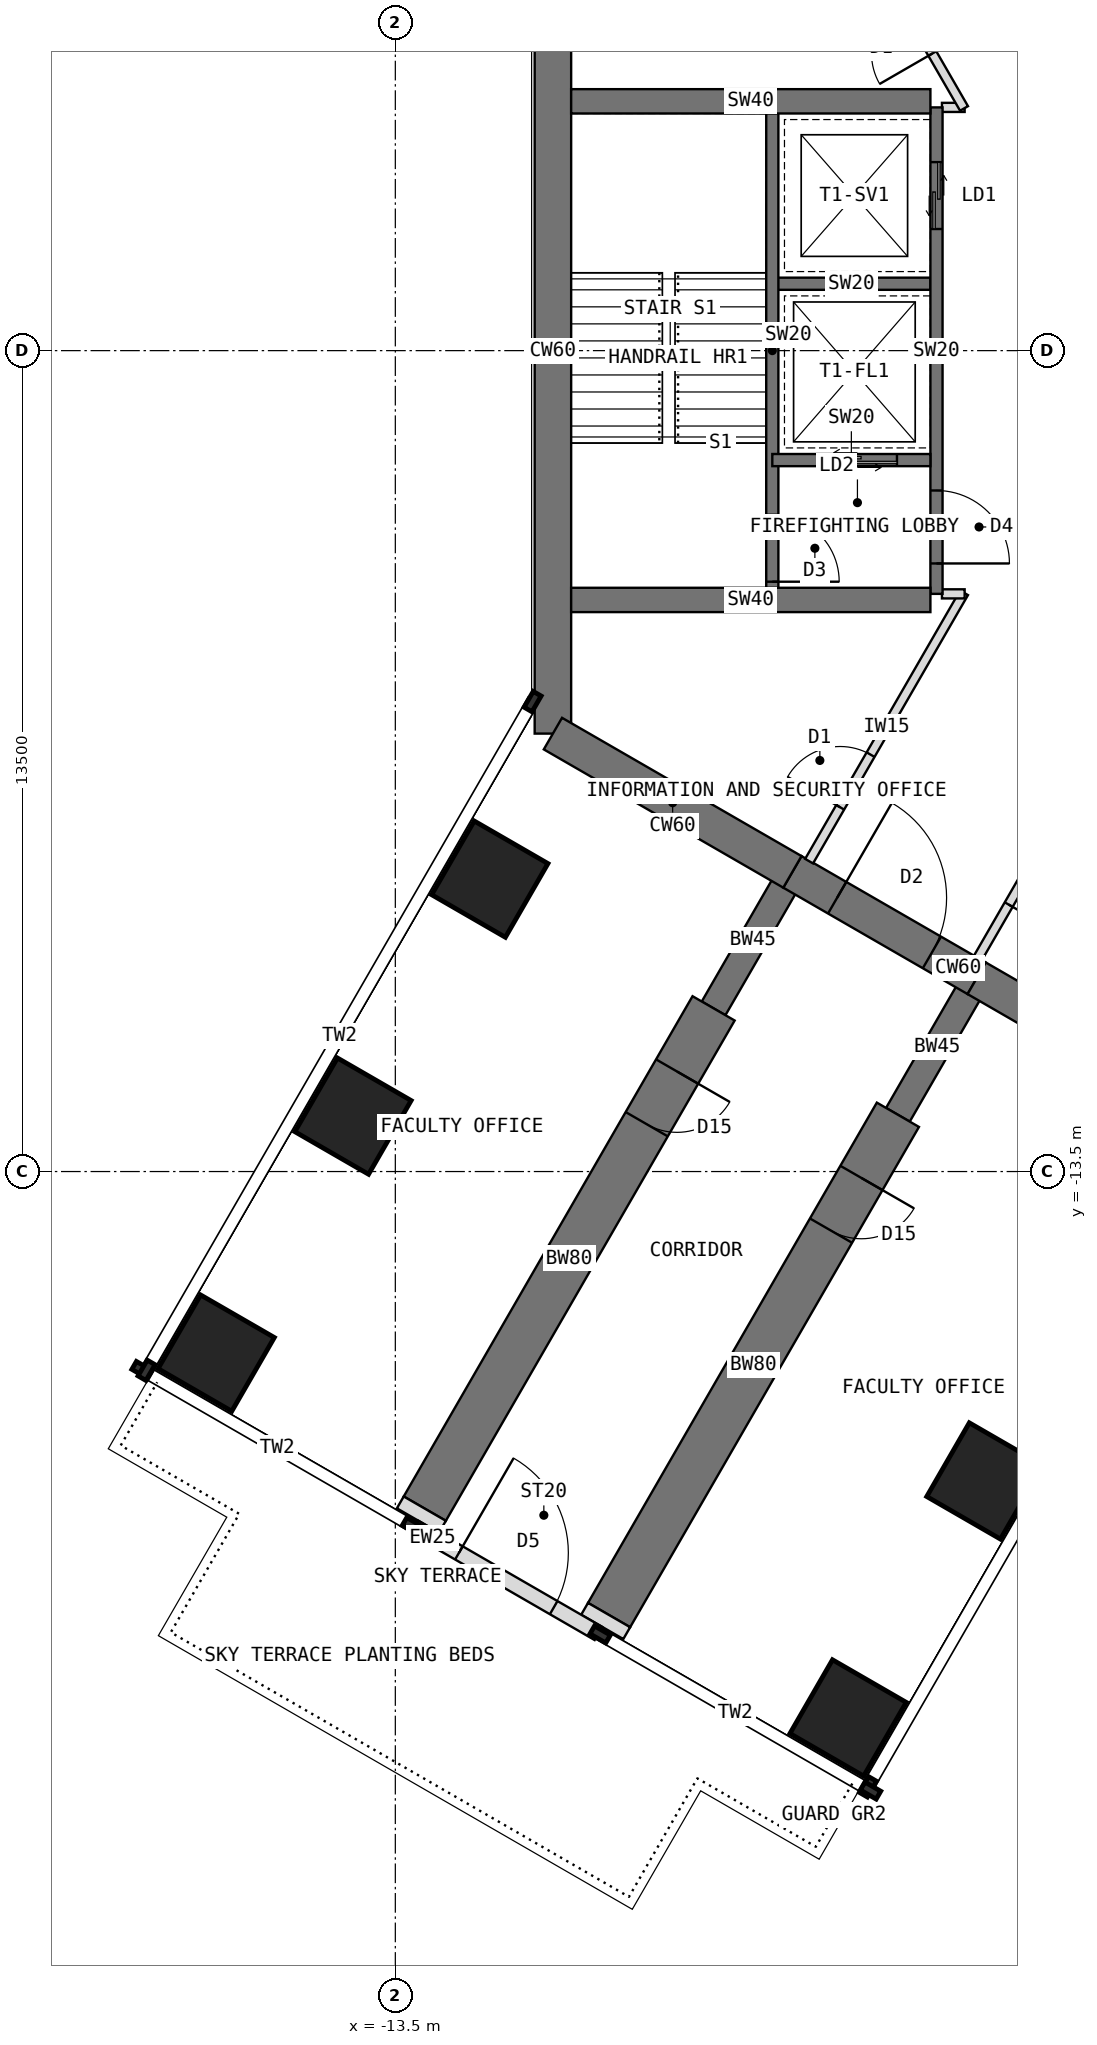
"""IFC4 building model, lengths in metres.
Left out: names, types, materials, properties, quantities, classifications, styles, units other than length and angle.
Written with IfcOpenShell. Run it as: python <this file> out.ifc"""

import sys

from ifc_helpers import new_model, si_unit, direction, frame, frame_2d, origin, origin_2d, place, context, subcontext, project, spatial, rectangle, extrude, element, fill, save


model = new_model("IFC4")
c1 = context("Model", 3, precision=1e-05, world=origin(), true_north=direction((0.0, 1.0)))
c2 = subcontext(c1, "Body", "Model", "MODEL_VIEW")
j1 = project(units=[si_unit("LENGTHUNIT", "METRE"), si_unit("PLANEANGLEUNIT", "RADIAN")], contexts=[c1])
p1 = place(None, origin())
s1 = spatial("IfcSite", under=j1, at=p1, CompositionType="ELEMENT")
p2 = place(p1, origin())
s2 = spatial("IfcBuilding", under=s1, at=p2, CompositionType="ELEMENT")
p3 = place(p2, frame((0.0, 0.0, 97.5)))
s3 = spatial("IfcBuildingStorey", under=s2, at=p3, CompositionType="ELEMENT", Elevation=97.5)
p4 = place(p3, frame((-10.908, 6.298, 0.0), z_axis=(0.0, 0.0, 1.0), x_axis=(0.0, -1.0, 0.0)))
e1 = element("IfcWall", 1, at=p4, inside=s3, PredefinedType="SHEAR", context=c2, shape_type="SweptSolid", body=[
    extrude(rectangle(XDim=12.596, YDim=0.6, at=frame_2d((6.298, 0.0))), origin(), (0.0, 0.0, 1.0), 4.0),
])
p5 = place(p3, frame((-10.908, -6.298, 0.0), z_axis=(0.0, 0.0, 1.0), x_axis=(0.866034513004, -0.499984222037, 0.0)))
e2 = element("IfcWall", 2, at=p5, inside=s3, PredefinedType="SHEAR", context=c2, shape_type="SweptSolid", body=[
    extrude(rectangle(XDim=4.548, YDim=0.6, at=frame_2d((2.274, 0.0))), origin(), (0.0, 0.0, 1.0), 4.0),
])
p6 = place(p3, frame((-6.97, -8.572, 0.0), z_axis=(0.0, 0.0, 1.0), x_axis=(0.866019471182, -0.500010275428, 0.0)))
e3 = element("IfcWall", 3, at=p6, inside=s3, PredefinedType="SHEAR", context=c2, shape_type="SweptSolid", body=[
    extrude(rectangle(XDim=3.5, YDim=0.6, at=frame_2d((1.75, 0.0))), origin(), (0.0, 0.0, 1.0), 4.0),
])
p7 = place(p6, frame((0.85, 0.0, 0.0)))
e4 = element("IfcOpeningElement", 4, at=p7, cuts=e3, PredefinedType="OPENING", context=c2, shape_type="SweptSolid", body=[
    extrude(rectangle(XDim=1.8, YDim=2.1, at=frame_2d((0.9, 1.05))), frame((0.0, 0.31, 0.0), z_axis=(0.0, -1.0, 0.0), x_axis=(1.0, 0.0, 0.0)), (0.0, 0.0, 1.0), 0.62),
])
p8 = place(p3, frame((-3.939, -10.322, 0.0), z_axis=(0.0, 0.0, 1.0), x_axis=(0.866011268655, -0.500024481964, 0.0)))
e5 = element("IfcWall", 5, at=p8, inside=s3, PredefinedType="SHEAR", context=c2, shape_type="SweptSolid", body=[
    extrude(rectangle(XDim=4.548, YDim=0.6, at=frame_2d((2.274, 0.0))), origin(), (0.0, 0.0, 1.0), 4.0),
])
p9 = place(p3, frame((-3.939, -10.322, 0.0), z_axis=(0.0, 0.0, 1.0), x_axis=(-0.499918158782, -0.866072649678, 0.0)))
e6 = element("IfcWall", 6, at=p9, inside=s3, PredefinedType="SHEAR", context=c2, shape_type="SweptSolid", body=[
    extrude(rectangle(XDim=2.592, YDim=0.45, at=frame_2d((1.296, 0.0))), origin(), (0.0, 0.0, 1.0), 4.0),
])
p10 = place(p3, frame((-5.234, -12.566, 0.0), z_axis=(0.0, 0.0, 1.0), x_axis=(-0.499997557548, -0.86602681393, 0.0)))
e7 = element("IfcWall", 7, at=p10, inside=s3, PredefinedType="SHEAR", context=c2, shape_type="SweptSolid", body=[
    extrude(rectangle(XDim=9.5, YDim=0.8, at=frame_2d((4.75, 0.0))), origin(), (0.0, 0.0, 1.0), 4.0),
])
p11 = place(p10, frame((1.2, 0.0, 0.0)))
e8 = element("IfcOpeningElement", 8, at=p11, cuts=e7, PredefinedType="OPENING", context=c2, shape_type="SweptSolid", body=[
    extrude(rectangle(XDim=1.0, YDim=2.1, at=frame_2d((0.5, 1.05))), frame((0.0, 0.41, 0.0), z_axis=(0.0, -1.0, 0.0), x_axis=(1.0, 0.0, 0.0)), (0.0, 0.0, 1.0), 0.82),
])
p12 = place(p3, frame((-6.97, -8.572, 0.0), z_axis=(0.0, 0.0, 1.0), x_axis=(-0.499988811324, -0.866031863473, 0.0)))
e9 = element("IfcWall", 9, at=p12, inside=s3, PredefinedType="SHEAR", context=c2, shape_type="SweptSolid", body=[
    extrude(rectangle(XDim=2.592, YDim=0.45, at=frame_2d((1.296, 0.0))), origin(), (0.0, 0.0, 1.0), 4.0),
])
p13 = place(p3, frame((-8.266, -10.816, 0.0), z_axis=(0.0, 0.0, 1.0), x_axis=(-0.499997557548, -0.86602681393, 0.0)))
e10 = element("IfcWall", 10, at=p13, inside=s3, PredefinedType="SHEAR", context=c2, shape_type="SweptSolid", body=[
    extrude(rectangle(XDim=9.5, YDim=0.8, at=frame_2d((4.75, 0.0))), origin(), (0.0, 0.0, 1.0), 4.0),
])
p14 = place(p13, frame((1.2, 0.0, 0.0)))
e11 = element("IfcOpeningElement", 11, at=p14, cuts=e10, PredefinedType="OPENING", context=c2, shape_type="SweptSolid", body=[
    extrude(rectangle(XDim=1.0, YDim=2.1, at=frame_2d((0.5, 1.05))), frame((0.0, 0.41, 0.0), z_axis=(0.0, -1.0, 0.0), x_axis=(1.0, 0.0, 0.0)), (0.0, 0.0, 1.0), 0.82),
])
for number, where, z_axis, x_axis in (
    (12, (-11.946, -8.691, 0.0), (0.0, 0.0, 1.0), (0.5, 0.866, 0.0)),
    (13, (-3.804, -18.588, 0.0), (0.0, 0.0, 1.0), (0.5, 0.866, 0.0)),
    (14, (-14.196, -12.588, 0.0), (0.0, 0.0, 1.0), (0.5, 0.866, 0.0)),
    (15, (-6.054, -22.486, 0.0), (0.0, 0.0, 1.0), (0.5, 0.866, 0.0)),
    (16, (-16.446, -16.486, 0.0), (0.0, 0.0, 1.0), (0.5, 0.866, 0.0)),
):
    element("IfcColumn", number, at=place(p3, frame(where, z_axis=z_axis, x_axis=x_axis)), inside=s3, PredefinedType="COLUMN", context=c2, shape_type="SweptSolid", body=[
        extrude(rectangle(XDim=1.4, YDim=1.4, at=origin_2d()), origin(), (0.0, 0.0, 1.0), 4.0),
    ])
p15 = place(p3, frame((-13.19, -19.347, 0.0), z_axis=(0.0, 0.0, 1.0), x_axis=(0.866019471182, -0.500010275428, 0.0)))
e17 = element("IfcWall", 17, at=p15, inside=s3, PredefinedType="STANDARD", context=c2, shape_type="SweptSolid", body=[
    extrude(rectangle(XDim=3.5, YDim=0.25, at=frame_2d((1.75, 0.0))), origin(), (0.0, 0.0, 1.0), 3.8),
])
p16 = place(p15, frame((0.85, 0.0, 0.0)))
e18 = element("IfcOpeningElement", 18, at=p16, cuts=e17, PredefinedType="OPENING", context=c2, shape_type="SweptSolid", body=[
    extrude(rectangle(XDim=1.8, YDim=2.4, at=frame_2d((0.9, 1.2))), frame((0.0, 0.135, 0.0), z_axis=(0.0, -1.0, 0.0), x_axis=(1.0, 0.0, 0.0)), (0.0, 0.0, 1.0), 0.27),
])
p17 = place(p3, frame((-9.984, -20.794, 0.0), z_axis=(0.0, 0.0, 1.0), x_axis=(-0.500223362819, -0.865896406789, 0.0)))
e19 = element("IfcWall", 19, at=p17, inside=s3, PredefinedType="PARTITIONING", context=c2, shape_type="SweptSolid", body=[
    extrude(rectangle(XDim=0.225, YDim=0.8, at=frame_2d((0.113, 0.0))), origin(), (0.0, 0.0, 1.0), 3.8),
])
p18 = place(p3, frame((-13.016, -19.044, 0.0), z_axis=(0.0, 0.0, 1.0), x_axis=(-0.499409130319, -0.866366273901, 0.0)))
e20 = element("IfcWall", 20, at=p18, inside=s3, PredefinedType="PARTITIONING", context=c2, shape_type="SweptSolid", body=[
    extrude(rectangle(XDim=0.225, YDim=0.8, at=frame_2d((0.112, 0.0))), origin(), (0.0, 0.0, 1.0), 3.8),
])
p19 = place(p3, frame((-4.6, 4.0, 0.0), z_axis=(0.0, 0.0, 1.0), x_axis=(0.0, -1.0, 0.0)))
e21 = element("IfcWall", 21, at=p19, inside=s3, PredefinedType="SHEAR", context=c2, shape_type="SweptSolid", body=[
    extrude(rectangle(XDim=8.0, YDim=0.2, at=frame_2d((4.0, 0.0))), origin(), (0.0, 0.0, 1.0), 4.0),
])
p20 = place(p19, frame((6.3, 0.0, 0.0)))
e22 = element("IfcOpeningElement", 22, at=p20, cuts=e21, PredefinedType="OPENING", context=c2, shape_type="SweptSolid", body=[
    extrude(rectangle(XDim=1.2, YDim=2.1, at=frame_2d((0.6, 1.05))), frame((0.0, 0.11, 0.0), z_axis=(0.0, -1.0, 0.0), x_axis=(1.0, 0.0, 0.0)), (0.0, 0.0, 1.0), 0.22),
])
p21 = place(p19, frame((0.9, 0.0, 0.0)))
e23 = element("IfcOpeningElement", 23, at=p21, cuts=e21, PredefinedType="OPENING", context=c2, shape_type="SweptSolid", body=[
    extrude(rectangle(XDim=1.1, YDim=2.2, at=frame_2d((0.55, 1.1))), frame((0.0, 0.11, 0.0), z_axis=(0.0, -1.0, 0.0), x_axis=(1.0, 0.0, 0.0)), (0.0, 0.0, 1.0), 0.22),
])
p22 = place(p3, frame((-4.7, 1.1, 0.0), z_axis=(0.0, 0.0, 1.0), x_axis=(-1.0, 0.0, 0.0)))
e24 = element("IfcWall", 24, at=p22, inside=s3, PredefinedType="SHEAR", context=c2, shape_type="SweptSolid", body=[
    extrude(rectangle(XDim=2.6, YDim=0.2, at=frame_2d((1.3, 0.0))), origin(), (0.0, 0.0, 1.0), 4.0),
])
p23 = place(p3, frame((-4.7, -1.8, 0.0), z_axis=(0.0, 0.0, 1.0), x_axis=(-1.0, 0.0, 0.0)))
e25 = element("IfcWall", 25, at=p23, inside=s3, PredefinedType="SHEAR", context=c2, shape_type="SweptSolid", body=[
    extrude(rectangle(XDim=2.6, YDim=0.2, at=frame_2d((1.3, 0.0))), origin(), (0.0, 0.0, 1.0), 4.0),
])
p24 = place(p23, frame((0.55, 0.0, 0.0)))
e26 = element("IfcOpeningElement", 26, at=p24, cuts=e25, PredefinedType="OPENING", context=c2, shape_type="SweptSolid", body=[
    extrude(rectangle(XDim=1.3, YDim=2.2, at=frame_2d((0.65, 1.1))), frame((0.0, 0.11, 0.0), z_axis=(0.0, -1.0, 0.0), x_axis=(1.0, 0.0, 0.0)), (0.0, 0.0, 1.0), 0.22),
])
p25 = place(p3, frame((-7.3, 4.0, 0.0), z_axis=(0.0, 0.0, 1.0), x_axis=(0.0, -1.0, 0.0)))
e27 = element("IfcWall", 27, at=p25, inside=s3, PredefinedType="SHEAR", context=c2, shape_type="SweptSolid", body=[
    extrude(rectangle(XDim=8.0, YDim=0.2, at=frame_2d((4.0, 0.0))), origin(), (0.0, 0.0, 1.0), 4.0),
])
p26 = place(p25, frame((6.7, 0.0, 0.0)))
e28 = element("IfcOpeningElement", 28, at=p26, cuts=e27, PredefinedType="OPENING", context=c2, shape_type="SweptSolid", body=[
    extrude(rectangle(XDim=1.1, YDim=2.1, at=frame_2d((0.55, 1.05))), frame((0.0, 0.11, 0.0), z_axis=(0.0, -1.0, 0.0), x_axis=(1.0, 0.0, 0.0)), (0.0, 0.0, 1.0), 0.22),
])
for number, where, z_axis, x_axis in (
    (29, (-4.7, -4.1, 0.0), (0.0, 0.0, 1.0), (-1.0, 0.0, 0.0)),
    (30, (-4.7, 4.1, 0.0), (0.0, 0.0, 1.0), (-1.0, 0.0, 0.0)),
):
    element("IfcWall", number, at=place(p3, frame(where, z_axis=z_axis, x_axis=x_axis)), inside=s3, PredefinedType="SHEAR", context=c2, shape_type="SweptSolid", body=[
        extrude(rectangle(XDim=5.908, YDim=0.4, at=frame_2d((2.954, 0.0))), origin(), (0.0, 0.0, 1.0), 4.0),
    ])
p27 = place(p3, frame((-1.375, -5.583, 0.0), z_axis=(0.0, 0.0, 1.0), x_axis=(-0.500050086259, -0.865996484538, 0.0)))
e31 = element("IfcWall", 31, at=p27, inside=s3, PredefinedType="PARTITIONING", context=c2, shape_type="SweptSolid", body=[
    extrude(rectangle(XDim=5.096, YDim=0.15, at=frame_2d((2.548, 0.0))), origin(), (0.0, 0.0, 1.0), 3.8),
])
p28 = place(p27, frame((3.073, 0.0, 0.0)))
e32 = element("IfcOpeningElement", 32, at=p28, cuts=e31, PredefinedType="OPENING", context=c2, shape_type="SweptSolid", body=[
    extrude(rectangle(XDim=1.0, YDim=2.1, at=frame_2d((0.5, 1.05))), frame((0.0, 0.085, 0.0), z_axis=(0.0, -1.0, 0.0), x_axis=(1.0, 0.0, 0.0)), (0.0, 0.0, 1.0), 0.17),
])
p29 = place(p3, frame((-6.695, -8.396, 0.0), z_axis=(0.0, 0.0, 1.0), x_axis=(0.499993407537, 0.866029209911, 0.0)))
e33 = element("IfcWall", 33, at=p29, inside=s3, PredefinedType="PARTITIONING", context=c2, shape_type="SweptSolid", body=[
    extrude(rectangle(XDim=5.096, YDim=0.15, at=frame_2d((2.548, 0.0))), origin(), (0.0, 0.0, 1.0), 3.8),
])
p30 = place(p29, frame((1.023, 0.0, 0.0)))
e34 = element("IfcOpeningElement", 34, at=p30, cuts=e33, PredefinedType="OPENING", context=c2, shape_type="SweptSolid", body=[
    extrude(rectangle(XDim=1.0, YDim=2.1, at=frame_2d((0.5, 1.05))), frame((0.0, 0.085, 0.0), z_axis=(0.0, -1.0, 0.0), x_axis=(1.0, 0.0, 0.0)), (0.0, 0.0, 1.0), 0.17),
])
for number, where, z_axis, x_axis in (
    (35, (-4.137, -4.0, 0.0), (0.0, 0.0, 1.0), (-1.0, 0.0, 0.0)),
    (36, (-4.51, 4.0, 0.0), (0.0, 0.0, 1.0), (1.0, 0.0, 0.0)),
):
    element("IfcWall", number, at=place(p3, frame(where, z_axis=z_axis, x_axis=x_axis)), inside=s3, PredefinedType="PARTITIONING", context=c2, shape_type="SweptSolid", body=[
        extrude(rectangle(XDim=0.373, YDim=0.15, at=frame_2d((0.187, 0.0))), origin(), (0.0, 0.0, 1.0), 3.8),
    ])
p31 = place(p3, frame((-4.147, 3.983, 0.0), z_axis=(0.0, 0.0, 1.0), x_axis=(-0.499993407537, 0.866029209911, 0.0)))
e37 = element("IfcWall", 37, at=p31, inside=s3, PredefinedType="PARTITIONING", context=c2, shape_type="SweptSolid", body=[
    extrude(rectangle(XDim=5.096, YDim=0.15, at=frame_2d((2.548, 0.0))), origin(), (0.0, 0.0, 1.0), 3.8),
])
p32 = place(p31, frame((1.043, 0.0, 0.0)))
e38 = element("IfcOpeningElement", 38, at=p32, cuts=e37, PredefinedType="OPENING", context=c2, shape_type="SweptSolid", body=[
    extrude(rectangle(XDim=1.0, YDim=2.1, at=frame_2d((0.5, 1.05))), frame((0.0, 0.085, 0.0), z_axis=(0.0, -1.0, 0.0), x_axis=(1.0, 0.0, 0.0)), (0.0, 0.0, 1.0), 0.17),
])
p33 = place(p16, origin())
e39 = element("IfcDoor", 39, at=p33, inside=s3, OperationType="DOUBLE_DOOR_DOUBLE_SWING", PredefinedType="DOOR", context=c2, shape_type="SweptSolid", body=[
    extrude(rectangle(XDim=1.8, YDim=2.4, at=frame_2d((0.9, 1.2))), frame((0.0, 0.025, 0.0), z_axis=(0.0, -1.0, 0.0), x_axis=(1.0, 0.0, 0.0)), (0.0, 0.0, 1.0), 0.05),
])
fill(e18, e39)
p34 = place(p20, origin())
e40 = element("IfcDoor", 40, at=p34, inside=s3, OperationType="SINGLE_SWING_RIGHT", PredefinedType="DOOR", context=c2, shape_type="SweptSolid", body=[
    extrude(rectangle(XDim=1.2, YDim=2.1, at=frame_2d((0.6, 1.05))), frame((0.0, 0.025, 0.0), z_axis=(0.0, -1.0, 0.0), x_axis=(1.0, 0.0, 0.0)), (0.0, 0.0, 1.0), 0.05),
])
fill(e22, e40)
p35 = place(p24, origin())
e41 = element("IfcDoor", 41, at=p35, inside=s3, OperationType="DOUBLE_DOOR_SLIDING", PredefinedType="DOOR", context=c2, shape_type="SweptSolid", body=[
    extrude(rectangle(XDim=1.3, YDim=2.2, at=frame_2d((0.65, 1.1))), frame((0.0, 0.025, 0.0), z_axis=(0.0, -1.0, 0.0), x_axis=(1.0, 0.0, 0.0)), (0.0, 0.0, 1.0), 0.05),
])
fill(e26, e41)
p36 = place(p21, origin())
e42 = element("IfcDoor", 42, at=p36, inside=s3, OperationType="DOUBLE_DOOR_SLIDING", PredefinedType="DOOR", context=c2, shape_type="SweptSolid", body=[
    extrude(rectangle(XDim=1.1, YDim=2.2, at=frame_2d((0.55, 1.1))), frame((0.0, 0.025, 0.0), z_axis=(0.0, -1.0, 0.0), x_axis=(1.0, 0.0, 0.0)), (0.0, 0.0, 1.0), 0.05),
])
fill(e23, e42)
p37 = place(p26, origin())
e43 = element("IfcDoor", 43, at=p37, inside=s3, OperationType="SINGLE_SWING_RIGHT", PredefinedType="DOOR", context=c2, shape_type="SweptSolid", body=[
    extrude(rectangle(XDim=1.1, YDim=2.1, at=frame_2d((0.55, 1.05))), frame((0.0, 0.025, 0.0), z_axis=(0.0, -1.0, 0.0), x_axis=(1.0, 0.0, 0.0)), (0.0, 0.0, 1.0), 0.05),
])
fill(e28, e43)
p38 = place(p7, origin())
e44 = element("IfcDoor", 44, at=p38, inside=s3, OperationType="DOUBLE_DOOR_DOUBLE_SWING", PredefinedType="DOOR", context=c2, shape_type="SweptSolid", body=[
    extrude(rectangle(XDim=1.72, YDim=2.06, at=frame_2d((0.9, 1.03))), frame((0.0, 0.025, 0.0), z_axis=(0.0, -1.0, 0.0), x_axis=(1.0, 0.0, 0.0)), (0.0, 0.0, 1.0), 0.05),
    extrude(rectangle(XDim=0.04, YDim=2.1, at=frame_2d((0.02, 1.05))), frame((0.0, 0.3, 0.0), z_axis=(0.0, -1.0, 0.0), x_axis=(1.0, 0.0, 0.0)), (0.0, 0.0, 1.0), 0.6),
    extrude(rectangle(XDim=0.04, YDim=2.1, at=frame_2d((1.78, 1.05))), frame((0.0, 0.3, 0.0), z_axis=(0.0, -1.0, 0.0), x_axis=(1.0, 0.0, 0.0)), (0.0, 0.0, 1.0), 0.6),
    extrude(rectangle(XDim=1.72, YDim=0.04, at=frame_2d((0.9, 2.08))), frame((0.0, 0.3, 0.0), z_axis=(0.0, -1.0, 0.0), x_axis=(1.0, 0.0, 0.0)), (0.0, 0.0, 1.0), 0.6),
])
fill(e4, e44)
p39 = place(p30, origin())
e45 = element("IfcDoor", 45, at=p39, inside=s3, OperationType="SINGLE_SWING_LEFT", PredefinedType="DOOR", context=c2, shape_type="SweptSolid", body=[
    extrude(rectangle(XDim=1.0, YDim=2.1, at=frame_2d((0.5, 1.05))), frame((0.0, 0.025, 0.0), z_axis=(0.0, -1.0, 0.0), x_axis=(1.0, 0.0, 0.0)), (0.0, 0.0, 1.0), 0.05),
])
fill(e34, e45)
p40 = place(p28, origin())
e46 = element("IfcDoor", 46, at=p40, inside=s3, OperationType="SINGLE_SWING_RIGHT", PredefinedType="DOOR", context=c2, shape_type="SweptSolid", body=[
    extrude(rectangle(XDim=1.0, YDim=2.1, at=frame_2d((0.5, 1.05))), frame((0.0, 0.025, 0.0), z_axis=(0.0, -1.0, 0.0), x_axis=(1.0, 0.0, 0.0)), (0.0, 0.0, 1.0), 0.05),
])
fill(e32, e46)
p41 = place(p32, origin())
e47 = element("IfcDoor", 47, at=p41, inside=s3, OperationType="SINGLE_SWING_LEFT", PredefinedType="DOOR", context=c2, shape_type="SweptSolid", body=[
    extrude(rectangle(XDim=1.0, YDim=2.1, at=frame_2d((0.5, 1.05))), frame((0.0, 0.025, 0.0), z_axis=(0.0, -1.0, 0.0), x_axis=(1.0, 0.0, 0.0)), (0.0, 0.0, 1.0), 0.05),
])
fill(e38, e47)
p42 = place(p11, origin())
e48 = element("IfcDoor", 48, at=p42, inside=s3, OperationType="SINGLE_SWING_LEFT", PredefinedType="DOOR", context=c2, shape_type="SweptSolid", body=[
    extrude(rectangle(XDim=0.92, YDim=2.06, at=frame_2d((0.5, 1.03))), frame((0.0, 0.025, 0.0), z_axis=(0.0, -1.0, 0.0), x_axis=(1.0, 0.0, 0.0)), (0.0, 0.0, 1.0), 0.05),
    extrude(rectangle(XDim=0.04, YDim=2.1, at=frame_2d((0.02, 1.05))), frame((0.0, 0.4, 0.0), z_axis=(0.0, -1.0, 0.0), x_axis=(1.0, 0.0, 0.0)), (0.0, 0.0, 1.0), 0.8),
    extrude(rectangle(XDim=0.04, YDim=2.1, at=frame_2d((0.98, 1.05))), frame((0.0, 0.4, 0.0), z_axis=(0.0, -1.0, 0.0), x_axis=(1.0, 0.0, 0.0)), (0.0, 0.0, 1.0), 0.8),
    extrude(rectangle(XDim=0.92, YDim=0.04, at=frame_2d((0.5, 2.08))), frame((0.0, 0.4, 0.0), z_axis=(0.0, -1.0, 0.0), x_axis=(1.0, 0.0, 0.0)), (0.0, 0.0, 1.0), 0.8),
])
fill(e8, e48)
p43 = place(p14, origin())
e49 = element("IfcDoor", 49, at=p43, inside=s3, OperationType="SINGLE_SWING_LEFT", PredefinedType="DOOR", context=c2, shape_type="SweptSolid", body=[
    extrude(rectangle(XDim=0.92, YDim=2.06, at=frame_2d((0.5, 1.03))), frame((0.0, 0.025, 0.0), z_axis=(0.0, -1.0, 0.0), x_axis=(1.0, 0.0, 0.0)), (0.0, 0.0, 1.0), 0.05),
    extrude(rectangle(XDim=0.04, YDim=2.1, at=frame_2d((0.02, 1.05))), frame((0.0, 0.4, 0.0), z_axis=(0.0, -1.0, 0.0), x_axis=(1.0, 0.0, 0.0)), (0.0, 0.0, 1.0), 0.8),
    extrude(rectangle(XDim=0.04, YDim=2.1, at=frame_2d((0.98, 1.05))), frame((0.0, 0.4, 0.0), z_axis=(0.0, -1.0, 0.0), x_axis=(1.0, 0.0, 0.0)), (0.0, 0.0, 1.0), 0.8),
    extrude(rectangle(XDim=0.92, YDim=0.04, at=frame_2d((0.5, 2.08))), frame((0.0, 0.4, 0.0), z_axis=(0.0, -1.0, 0.0), x_axis=(1.0, 0.0, 0.0)), (0.0, 0.0, 1.0), 0.8),
])
fill(e11, e49)
save(model, sys.argv[1])
